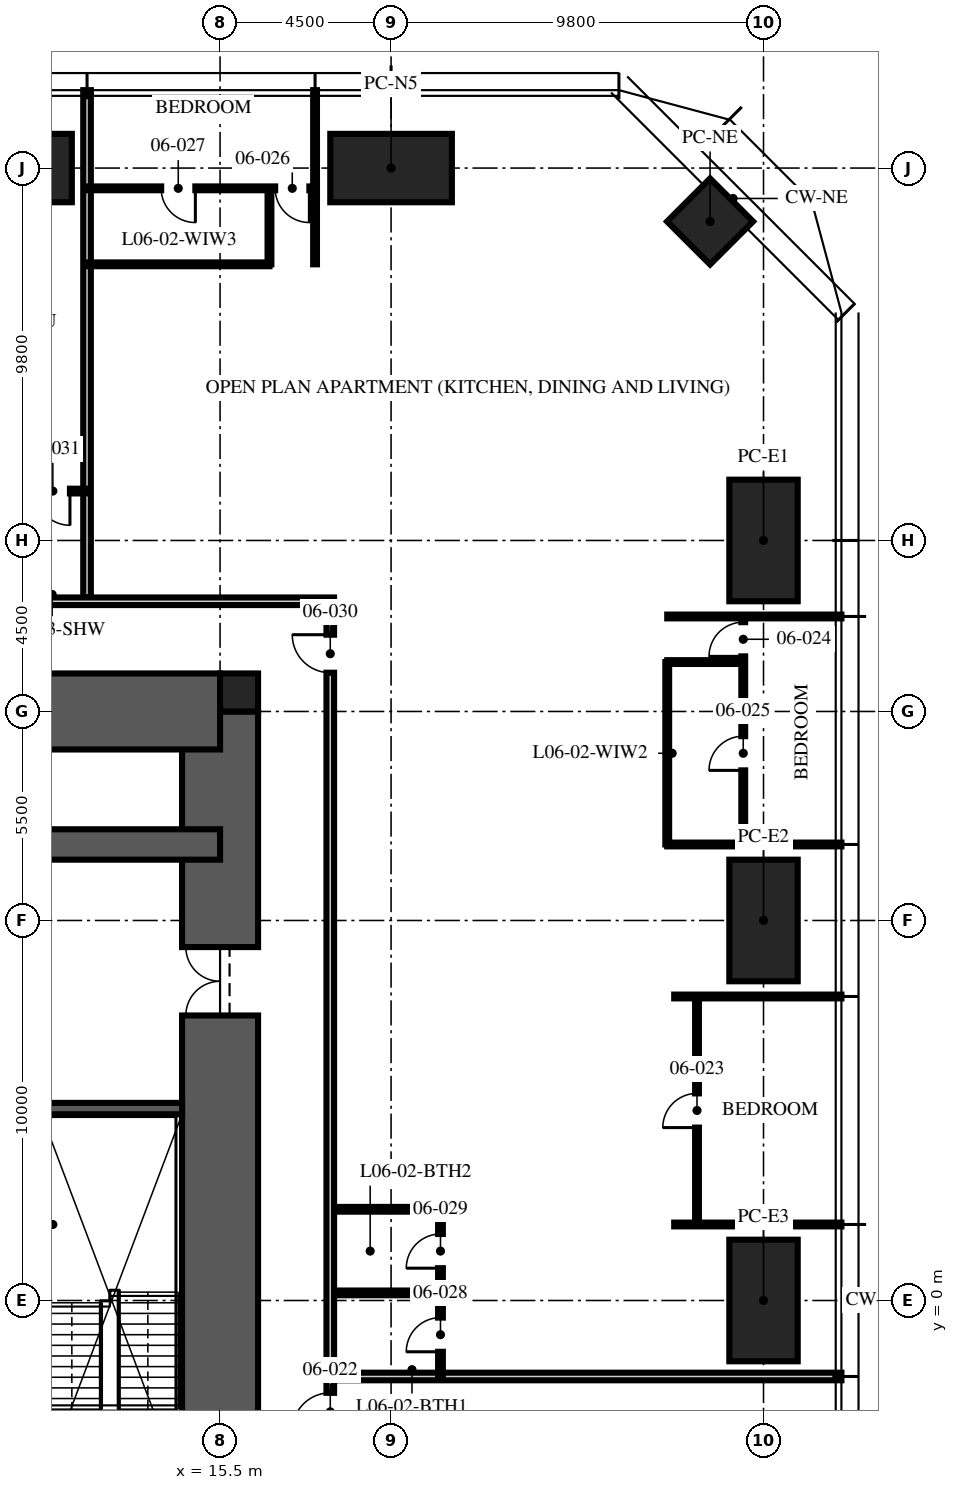
"""IFC4 building model, lengths in metres.
Left out: names, types, materials, properties, quantities, classifications, styles, units other than length and angle.
Written with IfcOpenShell. Run it as: python <this file> out.ifc"""

import sys

from ifc_helpers import new_model, si_unit, direction, frame, frame_2d, origin, origin_2d, place, context, subcontext, project, spatial, rectangle, hollow_rectangle, extrude, element, fill, save


model = new_model("IFC4")
c1 = context("Model", 3, precision=1e-05, world=origin(), true_north=direction((0.0, 1.0)))
c2 = subcontext(c1, "Body", "Model", "MODEL_VIEW")
j1 = project(units=[si_unit("LENGTHUNIT", "METRE"), si_unit("PLANEANGLEUNIT", "RADIAN")], contexts=[c1])
p1 = place(None, origin())
s1 = spatial("IfcSite", under=j1, at=p1, CompositionType="ELEMENT")
p2 = place(p1, origin())
s2 = spatial("IfcBuilding", under=s1, at=p2, CompositionType="ELEMENT")
p3 = place(p2, frame((0.0, 0.0, 28.5)))
s3 = spatial("IfcBuildingStorey", under=s2, at=p3, CompositionType="ELEMENT", Elevation=28.5)
p4 = place(p3, frame((15.5, -15.5, -0.25), z_axis=(0.0, 0.0, 1.0), x_axis=(0.0, 1.0, 0.0)))
e1 = element("IfcWall", 1, at=p4, inside=s3, PredefinedType="SHEAR", context=c2, shape_type="SweptSolid", body=[
    extrude(rectangle(XDim=31.0, YDim=2.0, at=frame_2d((15.5, 0.0))), origin(), (0.0, 0.0, 1.0), 3.75),
])
p5 = place(p4, frame((6.5, 0.0, 0.25)))
e2 = element("IfcOpeningElement", 2, at=p5, cuts=e1, PredefinedType="OPENING", context=c2, shape_type="SweptSolid", body=[
    extrude(rectangle(XDim=1.2, YDim=2.1, at=frame_2d((0.6, 1.05))), frame((0.0, 1.01, 0.0), z_axis=(0.0, -1.0, 0.0), x_axis=(1.0, 0.0, 0.0)), (0.0, 0.0, 1.0), 2.02),
])
p6 = place(p4, frame((23.0, 0.0, 0.25)))
e3 = element("IfcOpeningElement", 3, at=p6, cuts=e1, PredefinedType="OPENING", context=c2, shape_type="SweptSolid", body=[
    extrude(rectangle(XDim=1.8, YDim=2.1, at=frame_2d((0.9, 1.05))), frame((0.0, 1.01, 0.0), z_axis=(0.0, -1.0, 0.0), x_axis=(1.0, 0.0, 0.0)), (0.0, 0.0, 1.0), 2.02),
])
p7 = place(p3, frame((-15.5, 15.5, -0.25), z_axis=(0.0, 0.0, 1.0), x_axis=(1.0, 0.0, 0.0)))
e4 = element("IfcWall", 4, at=p7, inside=s3, PredefinedType="SHEAR", context=c2, shape_type="SweptSolid", body=[
    extrude(rectangle(XDim=31.0, YDim=2.0, at=frame_2d((15.5, 0.0))), origin(), (0.0, 0.0, 1.0), 3.75),
])
p8 = place(p7, frame((10.4, 0.0, 0.25)))
e5 = element("IfcOpeningElement", 5, at=p8, cuts=e4, PredefinedType="OPENING", context=c2, shape_type="SweptSolid", body=[
    extrude(rectangle(XDim=1.1, YDim=2.1, at=frame_2d((0.55, 1.05))), frame((0.0, 1.01, 0.0), z_axis=(0.0, -1.0, 0.0), x_axis=(1.0, 0.0, 0.0)), (0.0, 0.0, 1.0), 2.02),
])
p9 = place(p7, frame((13.5, 0.0, 0.25)))
e6 = element("IfcOpeningElement", 6, at=p9, cuts=e4, PredefinedType="OPENING", context=c2, shape_type="SweptSolid", body=[
    extrude(rectangle(XDim=1.1, YDim=2.1, at=frame_2d((0.55, 1.05))), frame((0.0, 1.01, 0.0), z_axis=(0.0, -1.0, 0.0), x_axis=(1.0, 0.0, 0.0)), (0.0, 0.0, 1.0), 2.02),
])
p10 = place(p7, frame((16.6, 0.0, 0.25)))
e7 = element("IfcOpeningElement", 7, at=p10, cuts=e4, PredefinedType="OPENING", context=c2, shape_type="SweptSolid", body=[
    extrude(rectangle(XDim=1.1, YDim=2.1, at=frame_2d((0.55, 1.05))), frame((0.0, 1.01, 0.0), z_axis=(0.0, -1.0, 0.0), x_axis=(1.0, 0.0, 0.0)), (0.0, 0.0, 1.0), 2.02),
])
p11 = place(p3, frame((-15.5, 12.0, -0.25), z_axis=(0.0, 0.0, 1.0), x_axis=(1.0, 0.0, 0.0)))
e8 = element("IfcWall", 8, at=p11, inside=s3, PredefinedType="SHEAR", context=c2, shape_type="SweptSolid", body=[
    extrude(rectangle(XDim=31.0, YDim=0.8, at=frame_2d((15.5, 0.0))), origin(), (0.0, 0.0, 1.0), 3.75),
])
p12 = place(p3, frame((16.0, 16.0, -0.25), z_axis=(0.0, 0.0, 1.0), x_axis=(1.0, 0.0, 0.0)))
e9 = element("IfcColumn", 9, at=p12, inside=s3, PredefinedType="COLUMN", context=c2, shape_type="SweptSolid", body=[
    extrude(rectangle(XDim=1.0, YDim=1.0, at=origin_2d()), origin(), (0.0, 0.0, 1.0), 3.75),
])
for number, where, z_axis, x_axis in (
    (10, (10.0, 29.8, 0.0), (0.0, 0.0, 1.0), (1.0, 0.0, 0.0)),
    (11, (20.0, 29.8, 0.0), (0.0, 0.0, 1.0), (1.0, 0.0, 0.0)),
    (12, (29.8, 20.0, 0.0), (0.0, 0.0, 1.0), (0.0, 1.0, 0.0)),
    (13, (29.8, 10.0, 0.0), (0.0, 0.0, 1.0), (0.0, 1.0, 0.0)),
    (14, (29.8, 0.0, 0.0), (0.0, 0.0, 1.0), (0.0, 1.0, 0.0)),
):
    element("IfcColumn", number, at=place(p3, frame(where, z_axis=z_axis, x_axis=x_axis)), inside=s3, PredefinedType="COLUMN", context=c2, shape_type="SweptSolid", body=[
        extrude(hollow_rectangle(XDim=3.2, YDim=1.8, WallThickness=0.2, at=origin_2d()), origin(), (0.0, 0.0, 1.0), 3.75),
    ])
p13 = place(p3, frame((28.394, 28.394, 0.0), z_axis=(0.0, 0.0, 1.0), x_axis=(0.707106781187, -0.707106781187, 0.0)))
e15 = element("IfcColumn", 15, at=p13, inside=s3, PredefinedType="COLUMN", context=c2, shape_type="SweptSolid", body=[
    extrude(hollow_rectangle(XDim=1.6, YDim=1.6, WallThickness=0.1, at=origin_2d()), origin(), (0.0, 0.0, 1.0), 3.75),
])
p14 = place(p3, frame((14.5, 5.05, 0.0), z_axis=(0.0, 0.0, 1.0), x_axis=(-1.0, 0.0, 0.0)))
e16 = element("IfcWall", 16, at=p14, inside=s3, PredefinedType="SOLIDWALL", context=c2, shape_type="SweptSolid", body=[
    extrude(rectangle(XDim=3.7, YDim=0.3, at=frame_2d((1.85, 0.0))), origin(), (0.0, 0.0, 1.0), 3.5),
])
p15 = place(p3, frame((18.5, -2.0, 0.0), z_axis=(0.0, 0.0, 1.0), x_axis=(1.0, 0.0, 0.0)))
e17 = element("IfcWall", 17, at=p15, inside=s3, PredefinedType="PARTITIONING", context=c2, shape_type="SweptSolid", body=[
    extrude(rectangle(XDim=13.35, YDim=0.2, at=frame_2d((6.675, 0.0))), origin(), (0.0, 0.0, 1.0), 2.71),
])
for number, where, z_axis, x_axis in (
    (18, (27.45, 2.0, 0.0), (0.0, 0.0, 1.0), (1.0, 0.0, 0.0)),
    (19, (27.45, 8.0, 0.0), (0.0, 0.0, 1.0), (1.0, 0.0, 0.0)),
):
    element("IfcWall", number, at=place(p3, frame(where, z_axis=z_axis, x_axis=x_axis)), inside=s3, PredefinedType="PARTITIONING", context=c2, shape_type="SweptSolid", body=[
        extrude(rectangle(XDim=4.4, YDim=0.1, at=frame_2d((2.2, 0.0))), origin(), (0.0, 0.0, 1.0), 2.71),
    ])
for number, where, z_axis, x_axis in (
    (20, (27.267, 12.0, 0.0), (0.0, 0.0, 1.0), (1.0, 0.0, 0.0)),
    (21, (27.267, 18.0, 0.0), (0.0, 0.0, 1.0), (1.0, 0.0, 0.0)),
    (22, (18.0, 27.267, 0.0), (0.0, 0.0, 1.0), (0.0, 1.0, 0.0)),
):
    element("IfcWall", number, at=place(p3, frame(where, z_axis=z_axis, x_axis=x_axis)), inside=s3, PredefinedType="PARTITIONING", context=c2, shape_type="SweptSolid", body=[
        extrude(rectangle(XDim=4.583, YDim=0.1, at=frame_2d((2.292, 0.0))), origin(), (0.0, 0.0, 1.0), 2.71),
    ])
p16 = place(p3, frame((12.0, 18.5, 0.0), z_axis=(0.0, 0.0, 1.0), x_axis=(0.0, 1.0, 0.0)))
e23 = element("IfcWall", 23, at=p16, inside=s3, PredefinedType="PARTITIONING", context=c2, shape_type="SweptSolid", body=[
    extrude(rectangle(XDim=13.35, YDim=0.2, at=frame_2d((6.675, 0.0))), origin(), (0.0, 0.0, 1.0), 2.71),
])
p17 = place(p3, frame((28.05, 2.0, 0.0), z_axis=(0.0, 0.0, 1.0), x_axis=(0.0, 1.0, 0.0)))
e24 = element("IfcWall", 24, at=p17, inside=s3, PredefinedType="PARTITIONING", context=c2, shape_type="SweptSolid", body=[
    extrude(rectangle(XDim=6.0, YDim=0.1, at=frame_2d((3.0, 0.0))), origin(), (0.0, 0.0, 1.0), 2.61),
])
p18 = place(p17, frame((2.55, 0.0, 0.0)))
e25 = element("IfcOpeningElement", 25, at=p18, cuts=e24, PredefinedType="OPENING", context=c2, shape_type="SweptSolid", body=[
    extrude(rectangle(XDim=0.9, YDim=2.1, at=frame_2d((0.45, 1.05))), frame((0.0, 0.06, 0.0), z_axis=(0.0, -1.0, 0.0), x_axis=(1.0, 0.0, 0.0)), (0.0, 0.0, 1.0), 0.12),
])
p19 = place(p3, frame((29.267, 12.0, 0.0), z_axis=(0.0, 0.0, 1.0), x_axis=(0.0, 1.0, 0.0)))
e26 = element("IfcWall", 26, at=p19, inside=s3, PredefinedType="PARTITIONING", context=c2, shape_type="SweptSolid", body=[
    extrude(rectangle(XDim=6.0, YDim=0.1, at=frame_2d((3.0, 0.0))), origin(), (0.0, 0.0, 1.0), 2.61),
])
p20 = place(p19, frame((4.95, 0.0, 0.0)))
e27 = element("IfcOpeningElement", 27, at=p20, cuts=e26, PredefinedType="OPENING", context=c2, shape_type="SweptSolid", body=[
    extrude(rectangle(XDim=0.9, YDim=2.1, at=frame_2d((0.45, 1.05))), frame((0.0, 0.06, 0.0), z_axis=(0.0, -1.0, 0.0), x_axis=(1.0, 0.0, 0.0)), (0.0, 0.0, 1.0), 0.12),
])
p21 = place(p19, frame((1.95, 0.0, 0.0)))
e28 = element("IfcOpeningElement", 28, at=p21, cuts=e26, PredefinedType="OPENING", context=c2, shape_type="SweptSolid", body=[
    extrude(rectangle(XDim=0.9, YDim=2.1, at=frame_2d((0.45, 1.05))), frame((0.0, 0.06, 0.0), z_axis=(0.0, -1.0, 0.0), x_axis=(1.0, 0.0, 0.0)), (0.0, 0.0, 1.0), 0.12),
])
p22 = place(p3, frame((27.267, 16.8, 0.0), z_axis=(0.0, 0.0, 1.0), x_axis=(1.0, 0.0, 0.0)))
e29 = element("IfcWall", 29, at=p22, inside=s3, PredefinedType="PARTITIONING", context=c2, shape_type="SweptSolid", body=[
    extrude(rectangle(XDim=2.0, YDim=0.1, at=frame_2d((1.0, 0.0))), origin(), (0.0, 0.0, 1.0), 3.5),
])
p23 = place(p3, frame((27.267, 12.0, 0.0), z_axis=(0.0, 0.0, 1.0), x_axis=(0.0, 1.0, 0.0)))
e30 = element("IfcWall", 30, at=p23, inside=s3, PredefinedType="PARTITIONING", context=c2, shape_type="SweptSolid", body=[
    extrude(rectangle(XDim=4.8, YDim=0.1, at=frame_2d((2.4, 0.0))), origin(), (0.0, 0.0, 1.0), 2.61),
])
p24 = place(p3, frame((18.0, 29.267, 0.0), z_axis=(0.0, 0.0, 1.0), x_axis=(-1.0, 0.0, 0.0)))
e31 = element("IfcWall", 31, at=p24, inside=s3, PredefinedType="PARTITIONING", context=c2, shape_type="SweptSolid", body=[
    extrude(rectangle(XDim=6.0, YDim=0.1, at=frame_2d((3.0, 0.0))), origin(), (0.0, 0.0, 1.0), 2.61),
])
p25 = place(p24, frame((0.15, 0.0, 0.0)))
e32 = element("IfcOpeningElement", 32, at=p25, cuts=e31, PredefinedType="OPENING", context=c2, shape_type="SweptSolid", body=[
    extrude(rectangle(XDim=0.9, YDim=2.1, at=frame_2d((0.45, 1.05))), frame((0.0, 0.06, 0.0), z_axis=(0.0, -1.0, 0.0), x_axis=(1.0, 0.0, 0.0)), (0.0, 0.0, 1.0), 0.12),
])
p26 = place(p24, frame((3.15, 0.0, 0.0)))
e33 = element("IfcOpeningElement", 33, at=p26, cuts=e31, PredefinedType="OPENING", context=c2, shape_type="SweptSolid", body=[
    extrude(rectangle(XDim=0.9, YDim=2.1, at=frame_2d((0.45, 1.05))), frame((0.0, 0.06, 0.0), z_axis=(0.0, -1.0, 0.0), x_axis=(1.0, 0.0, 0.0)), (0.0, 0.0, 1.0), 0.12),
])
p27 = place(p3, frame((16.8, 27.267, 0.0), z_axis=(0.0, 0.0, 1.0), x_axis=(0.0, 1.0, 0.0)))
e34 = element("IfcWall", 34, at=p27, inside=s3, PredefinedType="PARTITIONING", context=c2, shape_type="SweptSolid", body=[
    extrude(rectangle(XDim=2.0, YDim=0.1, at=frame_2d((1.0, 0.0))), origin(), (0.0, 0.0, 1.0), 3.5),
])
p28 = place(p3, frame((16.8, 27.267, 0.0), z_axis=(0.0, 0.0, 1.0), x_axis=(-1.0, 0.0, 0.0)))
e35 = element("IfcWall", 35, at=p28, inside=s3, PredefinedType="PARTITIONING", context=c2, shape_type="SweptSolid", body=[
    extrude(rectangle(XDim=4.8, YDim=0.1, at=frame_2d((2.4, 0.0))), origin(), (0.0, 0.0, 1.0), 2.61),
])
p29 = place(p3, frame((21.3, -2.0, 0.0), z_axis=(0.0, 0.0, 1.0), x_axis=(0.0, 1.0, 0.0)))
e36 = element("IfcWall", 36, at=p29, inside=s3, PredefinedType="PARTITIONING", context=c2, shape_type="SweptSolid", body=[
    extrude(rectangle(XDim=4.4, YDim=0.125, at=frame_2d((2.2, 0.0))), origin(), (0.0, 0.0, 1.0), 2.492),
])
p30 = place(p29, frame((0.65, 0.0, 0.0)))
e37 = element("IfcOpeningElement", 37, at=p30, cuts=e36, PredefinedType="OPENING", context=c2, shape_type="SweptSolid", body=[
    extrude(rectangle(XDim=0.9, YDim=2.1, at=frame_2d((0.45, 1.05))), frame((0.0, 0.073, 0.0), z_axis=(0.0, -1.0, 0.0), x_axis=(1.0, 0.0, 0.0)), (0.0, 0.0, 1.0), 0.145),
])
p31 = place(p29, frame((2.85, 0.0, 0.0)))
e38 = element("IfcOpeningElement", 38, at=p31, cuts=e36, PredefinedType="OPENING", context=c2, shape_type="SweptSolid", body=[
    extrude(rectangle(XDim=0.9, YDim=2.1, at=frame_2d((0.45, 1.05))), frame((0.0, 0.073, 0.0), z_axis=(0.0, -1.0, 0.0), x_axis=(1.0, 0.0, 0.0)), (0.0, 0.0, 1.0), 0.145),
])
p32 = place(p3, frame((18.5, 0.2, 0.0), z_axis=(0.0, 0.0, 1.0), x_axis=(1.0, 0.0, 0.0)))
e39 = element("IfcWall", 39, at=p32, inside=s3, PredefinedType="PARTITIONING", context=c2, shape_type="SweptSolid", body=[
    extrude(rectangle(XDim=2.8, YDim=0.125, at=frame_2d((1.4, 0.0))), origin(), (0.0, 0.0, 1.0), 2.492),
])
p33 = place(p3, frame((18.5, 2.4, 0.0), z_axis=(0.0, 0.0, 1.0), x_axis=(1.0, 0.0, 0.0)))
e40 = element("IfcWall", 40, at=p33, inside=s3, PredefinedType="PARTITIONING", context=c2, shape_type="SweptSolid", body=[
    extrude(rectangle(XDim=2.8, YDim=0.125, at=frame_2d((1.4, 0.0))), origin(), (0.0, 0.0, 1.0), 3.5),
])
p34 = place(p3, frame((12.0, 21.3, 0.0), z_axis=(0.0, 0.0, 1.0), x_axis=(-1.0, 0.0, 0.0)))
e41 = element("IfcWall", 41, at=p34, inside=s3, PredefinedType="PARTITIONING", context=c2, shape_type="SweptSolid", body=[
    extrude(rectangle(XDim=1.8, YDim=0.125, at=frame_2d((0.9, 0.0))), origin(), (0.0, 0.0, 1.0), 3.5),
])
p35 = place(p34, frame((0.45, 0.0, 0.0)))
e42 = element("IfcOpeningElement", 42, at=p35, cuts=e41, PredefinedType="OPENING", context=c2, shape_type="SweptSolid", body=[
    extrude(rectangle(XDim=0.9, YDim=2.1, at=frame_2d((0.45, 1.05))), frame((0.0, 0.073, 0.0), z_axis=(0.0, -1.0, 0.0), x_axis=(1.0, 0.0, 0.0)), (0.0, 0.0, 1.0), 0.145),
])
p36 = place(p3, frame((18.4, -18.3, 0.0), z_axis=(0.0, 0.0, 1.0), x_axis=(0.0, 1.0, 0.0)))
e43 = element("IfcWall", 43, at=p36, inside=s3, PredefinedType="PARTITIONING", context=c2, shape_type="SweptSolid", body=[
    extrude(rectangle(XDim=36.6, YDim=0.2, at=frame_2d((18.3, 0.0))), origin(), (0.0, 0.0, 1.0), 2.3),
])
p37 = place(p36, frame((14.87, 0.0, 0.0)))
e44 = element("IfcOpeningElement", 44, at=p37, cuts=e43, PredefinedType="OPENING", context=c2, shape_type="SweptSolid", body=[
    extrude(rectangle(XDim=1.0, YDim=2.2, at=frame_2d((0.5, 1.1))), frame((0.0, 0.11, 0.0), z_axis=(0.0, -1.0, 0.0), x_axis=(1.0, 0.0, 0.0)), (0.0, 0.0, 1.0), 0.22),
])
p38 = place(p36, frame((34.82, 0.0, 0.0)))
e45 = element("IfcOpeningElement", 45, at=p38, cuts=e43, PredefinedType="OPENING", context=c2, shape_type="SweptSolid", body=[
    extrude(rectangle(XDim=1.0, YDim=2.2, at=frame_2d((0.5, 1.1))), frame((0.0, 0.11, 0.0), z_axis=(0.0, -1.0, 0.0), x_axis=(1.0, 0.0, 0.0)), (0.0, 0.0, 1.0), 0.22),
])
p39 = place(p36, frame((8.7, 0.0, 0.0)))
e46 = element("IfcOpeningElement", 46, at=p39, cuts=e43, PredefinedType="OPENING", context=c2, shape_type="SweptSolid", body=[
    extrude(rectangle(XDim=1.0, YDim=2.2, at=frame_2d((0.5, 1.1))), frame((0.0, 0.11, 0.0), z_axis=(0.0, -1.0, 0.0), x_axis=(1.0, 0.0, 0.0)), (0.0, 0.0, 1.0), 0.22),
])
p40 = place(p3, frame((0.0, 18.4, 0.0), z_axis=(0.0, 0.0, 1.0), x_axis=(1.0, 0.0, 0.0)))
e47 = element("IfcWall", 47, at=p40, inside=s3, PredefinedType="PARTITIONING", context=c2, shape_type="SweptSolid", body=[
    extrude(rectangle(XDim=18.5, YDim=0.2, at=frame_2d((9.25, 0.0))), origin(), (0.0, 0.0, 1.0), 2.3),
])
p41 = place(p40, frame((8.43, 0.0, 0.0)))
e48 = element("IfcOpeningElement", 48, at=p41, cuts=e47, PredefinedType="OPENING", context=c2, shape_type="SweptSolid", body=[
    extrude(rectangle(XDim=1.0, YDim=2.2, at=frame_2d((0.5, 1.1))), frame((0.0, 0.11, 0.0), z_axis=(0.0, -1.0, 0.0), x_axis=(1.0, 0.0, 0.0)), (0.0, 0.0, 1.0), 0.22),
])
p42 = place(p6, origin())
e49 = element("IfcDoor", 49, at=p42, inside=s3, OperationType="DOUBLE_DOOR_SINGLE_SWING", PredefinedType="DOOR", context=c2, shape_type="SweptSolid", body=[
    extrude(rectangle(XDim=1.8, YDim=2.1, at=frame_2d((0.9, 1.05))), frame((0.0, 0.025, 0.0), z_axis=(0.0, -1.0, 0.0), x_axis=(1.0, 0.0, 0.0)), (0.0, 0.0, 1.0), 0.05),
])
fill(e3, e49)
p43 = place(p37, origin())
e50 = element("IfcDoor", 50, at=p43, inside=s3, OperationType="SINGLE_SWING_LEFT", PredefinedType="DOOR", context=c2, shape_type="SweptSolid", body=[
    extrude(rectangle(XDim=1.0, YDim=2.2, at=frame_2d((0.5, 1.1))), frame((0.0, 0.025, 0.0), z_axis=(0.0, -1.0, 0.0), x_axis=(1.0, 0.0, 0.0)), (0.0, 0.0, 1.0), 0.05),
])
fill(e44, e50)
p44 = place(p18, origin())
e51 = element("IfcDoor", 51, at=p44, inside=s3, OperationType="SINGLE_SWING_LEFT", PredefinedType="DOOR", context=c2, shape_type="SweptSolid", body=[
    extrude(rectangle(XDim=0.9, YDim=2.1, at=frame_2d((0.45, 1.05))), frame((0.0, 0.025, 0.0), z_axis=(0.0, -1.0, 0.0), x_axis=(1.0, 0.0, 0.0)), (0.0, 0.0, 1.0), 0.05),
])
fill(e25, e51)
p45 = place(p20, origin())
e52 = element("IfcDoor", 52, at=p45, inside=s3, OperationType="SINGLE_SWING_LEFT", PredefinedType="DOOR", context=c2, shape_type="SweptSolid", body=[
    extrude(rectangle(XDim=0.9, YDim=2.1, at=frame_2d((0.45, 1.05))), frame((0.0, 0.025, 0.0), z_axis=(0.0, -1.0, 0.0), x_axis=(1.0, 0.0, 0.0)), (0.0, 0.0, 1.0), 0.05),
])
fill(e27, e52)
p46 = place(p21, origin())
e53 = element("IfcDoor", 53, at=p46, inside=s3, OperationType="SINGLE_SWING_LEFT", PredefinedType="DOOR", context=c2, shape_type="SweptSolid", body=[
    extrude(rectangle(XDim=0.9, YDim=2.1, at=frame_2d((0.45, 1.05))), frame((0.0, 0.025, 0.0), z_axis=(0.0, -1.0, 0.0), x_axis=(1.0, 0.0, 0.0)), (0.0, 0.0, 1.0), 0.05),
])
fill(e28, e53)
p47 = place(p25, origin())
e54 = element("IfcDoor", 54, at=p47, inside=s3, OperationType="SINGLE_SWING_LEFT", PredefinedType="DOOR", context=c2, shape_type="SweptSolid", body=[
    extrude(rectangle(XDim=0.9, YDim=2.1, at=frame_2d((0.45, 1.05))), frame((0.0, 0.025, 0.0), z_axis=(0.0, -1.0, 0.0), x_axis=(1.0, 0.0, 0.0)), (0.0, 0.0, 1.0), 0.05),
])
fill(e32, e54)
p48 = place(p26, origin())
e55 = element("IfcDoor", 55, at=p48, inside=s3, OperationType="SINGLE_SWING_LEFT", PredefinedType="DOOR", context=c2, shape_type="SweptSolid", body=[
    extrude(rectangle(XDim=0.9, YDim=2.1, at=frame_2d((0.45, 1.05))), frame((0.0, 0.025, 0.0), z_axis=(0.0, -1.0, 0.0), x_axis=(1.0, 0.0, 0.0)), (0.0, 0.0, 1.0), 0.05),
])
fill(e33, e55)
p49 = place(p30, origin())
e56 = element("IfcDoor", 56, at=p49, inside=s3, OperationType="SINGLE_SWING_LEFT", PredefinedType="DOOR", context=c2, shape_type="SweptSolid", body=[
    extrude(rectangle(XDim=0.9, YDim=2.1, at=frame_2d((0.45, 1.05))), frame((0.0, 0.025, 0.0), z_axis=(0.0, -1.0, 0.0), x_axis=(1.0, 0.0, 0.0)), (0.0, 0.0, 1.0), 0.05),
])
fill(e37, e56)
p50 = place(p31, origin())
e57 = element("IfcDoor", 57, at=p50, inside=s3, OperationType="SINGLE_SWING_LEFT", PredefinedType="DOOR", context=c2, shape_type="SweptSolid", body=[
    extrude(rectangle(XDim=0.9, YDim=2.1, at=frame_2d((0.45, 1.05))), frame((0.0, 0.025, 0.0), z_axis=(0.0, -1.0, 0.0), x_axis=(1.0, 0.0, 0.0)), (0.0, 0.0, 1.0), 0.05),
])
fill(e38, e57)
p51 = place(p38, origin())
e58 = element("IfcDoor", 58, at=p51, inside=s3, OperationType="SINGLE_SWING_RIGHT", PredefinedType="DOOR", context=c2, shape_type="SweptSolid", body=[
    extrude(rectangle(XDim=1.0, YDim=2.2, at=frame_2d((0.5, 1.1))), frame((0.0, 0.025, 0.0), z_axis=(0.0, -1.0, 0.0), x_axis=(1.0, 0.0, 0.0)), (0.0, 0.0, 1.0), 0.05),
])
fill(e45, e58)
p52 = place(p35, origin())
e59 = element("IfcDoor", 59, at=p52, inside=s3, OperationType="SINGLE_SWING_LEFT", PredefinedType="DOOR", context=c2, shape_type="SweptSolid", body=[
    extrude(rectangle(XDim=0.9, YDim=2.1, at=frame_2d((0.45, 1.05))), frame((0.0, 0.025, 0.0), z_axis=(0.0, -1.0, 0.0), x_axis=(1.0, 0.0, 0.0)), (0.0, 0.0, 1.0), 0.05),
])
fill(e42, e59)
save(model, sys.argv[1])
